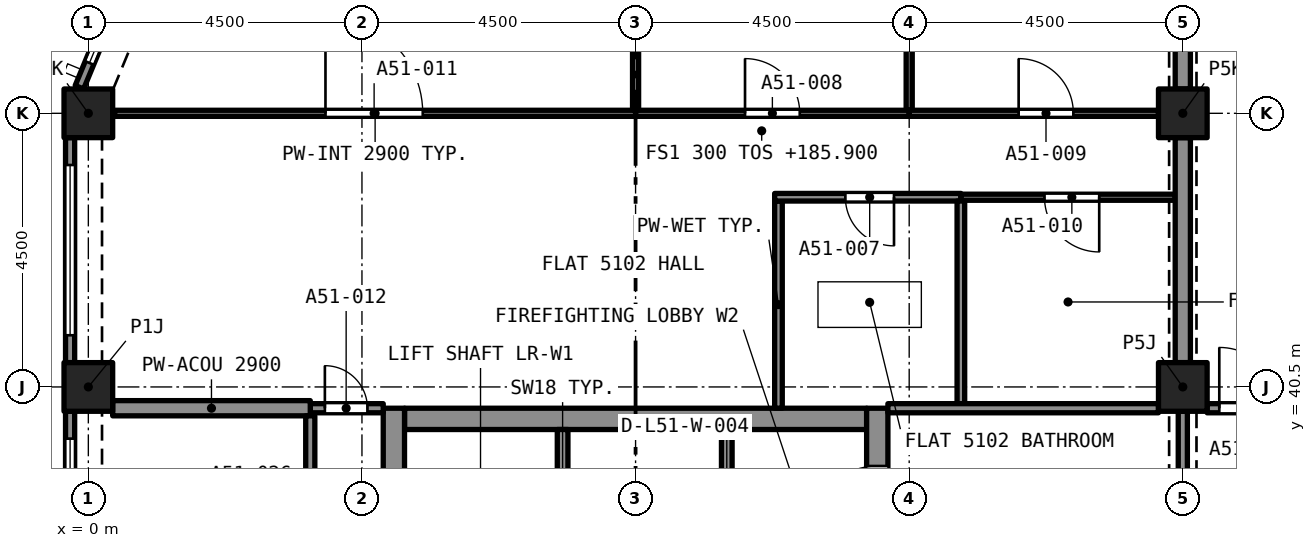
"""IFC4 building model, lengths in metres.
Left out: names, types, materials, properties, quantities, classifications, styles, units other than length and angle.
Written with IfcOpenShell. Run it as: python <this file> out.ifc"""

import sys

from ifc_helpers import new_model, si_unit, direction, frame, frame_2d, origin, origin_2d, place, context, subcontext, project, spatial, rectangle, extrude, element, fill, save


model = new_model("IFC4")
c1 = context("Model", 3, precision=1e-05, world=origin(), true_north=direction((0.0, 1.0)))
c2 = subcontext(c1, "Body", "Model", "MODEL_VIEW")
j1 = project(units=[si_unit("LENGTHUNIT", "METRE"), si_unit("PLANEANGLEUNIT", "RADIAN")], contexts=[c1])
p1 = place(None, origin())
s1 = spatial("IfcSite", under=j1, at=p1, CompositionType="ELEMENT")
p2 = place(p1, origin())
s2 = spatial("IfcBuilding", under=s1, at=p2, CompositionType="ELEMENT")
p3 = place(p2, frame((0.0, 0.0, 185.9)))
s3 = spatial("IfcBuildingStorey", under=s2, at=p3, CompositionType="ELEMENT", Elevation=185.9)
for number, where, z_axis, x_axis in (
    (1, (0.0, 40.5, 0.0), (0.0, 0.0, 1.0), (1.0, 0.0, 0.0)),
    (2, (18.0, 40.5, 0.0), (0.0, 0.0, 1.0), (1.0, 0.0, 0.0)),
    (3, (0.0, 45.0, 0.0), (0.0, 0.0, 1.0), (1.0, 0.0, 0.0)),
    (4, (18.0, 45.0, 0.0), (0.0, 0.0, 1.0), (1.0, 0.0, 0.0)),
):
    element("IfcColumn", number, at=place(p3, frame(where, z_axis=z_axis, x_axis=x_axis)), inside=s3, PredefinedType="COLUMN", context=c2, shape_type="SweptSolid", body=[
        extrude(rectangle(XDim=0.8, YDim=0.8, at=origin_2d()), origin(), (0.0, 0.0, 1.0), 3.2),
    ])
p4 = place(p3, frame((5.2, 39.975, 0.0), z_axis=(0.0, 0.0, 1.0), x_axis=(1.0, 0.0, 0.0)))
e5 = element("IfcWall", 5, at=p4, inside=s3, PredefinedType="SOLIDWALL", context=c2, shape_type="SweptSolid", body=[
    extrude(rectangle(XDim=7.6, YDim=0.35, at=frame_2d((3.8, 0.0))), origin(), (0.0, 0.0, 1.0), 3.2),
])
p5 = place(p3, frame((5.025, 27.35, 0.0), z_axis=(0.0, 0.0, 1.0), x_axis=(0.0, 1.0, 0.0)))
e6 = element("IfcWall", 6, at=p5, inside=s3, PredefinedType="SOLIDWALL", context=c2, shape_type="SweptSolid", body=[
    extrude(rectangle(XDim=12.8, YDim=0.35, at=frame_2d((6.4, 0.0))), origin(), (0.0, 0.0, 1.0), 3.2),
])
p6 = place(p5, frame((8.6, 0.0, 0.0)))
e7 = element("IfcOpeningElement", 7, at=p6, cuts=e6, PredefinedType="OPENING", context=c2, shape_type="SweptSolid", body=[
    extrude(rectangle(XDim=1.2, YDim=2.1, at=frame_2d((0.6, 1.05))), frame((0.0, 0.185, 0.0), z_axis=(0.0, -1.0, 0.0), x_axis=(1.0, 0.0, 0.0)), (0.0, 0.0, 1.0), 0.37),
])
p7 = place(p3, frame((12.975, 27.35, 0.0), z_axis=(0.0, 0.0, 1.0), x_axis=(0.0, 1.0, 0.0)))
e8 = element("IfcWall", 8, at=p7, inside=s3, PredefinedType="SOLIDWALL", context=c2, shape_type="SweptSolid", body=[
    extrude(rectangle(XDim=12.8, YDim=0.35, at=frame_2d((6.4, 0.0))), origin(), (0.0, 0.0, 1.0), 3.2),
])
p8 = place(p7, frame((10.75, 0.0, 0.0)))
e9 = element("IfcOpeningElement", 9, at=p8, cuts=e8, PredefinedType="OPENING", context=c2, shape_type="SweptSolid", body=[
    extrude(rectangle(XDim=1.1, YDim=2.1, at=frame_2d((0.55, 1.05))), frame((0.0, 0.185, 0.0), z_axis=(0.0, -1.0, 0.0), x_axis=(1.0, 0.0, 0.0)), (0.0, 0.0, 1.0), 0.37),
])
p9 = place(p7, frame((8.6, 0.0, 0.0)))
e10 = element("IfcOpeningElement", 10, at=p9, cuts=e8, PredefinedType="OPENING", context=c2, shape_type="SweptSolid", body=[
    extrude(rectangle(XDim=1.2, YDim=2.1, at=frame_2d((0.6, 1.05))), frame((0.0, 0.185, 0.0), z_axis=(0.0, -1.0, 0.0), x_axis=(1.0, 0.0, 0.0)), (0.0, 0.0, 1.0), 0.37),
])
p10 = place(p3, frame((-0.147, 45.429, 0.0), z_axis=(0.0, 0.0, 1.0), x_axis=(0.382669406082, 0.923885342263, 0.0)))
e11 = element("IfcWall", 11, at=p10, inside=s3, PredefinedType="SOLIDWALL", context=c2, shape_type="SweptSolid", body=[
    extrude(rectangle(XDim=2.602, YDim=0.15, at=frame_2d((1.301, 0.0))), origin(), (0.0, 0.0, 1.0), 3.2),
])
p11 = place(p10, frame((0.432, 0.0, 0.45)))
e12 = element("IfcOpeningElement", 12, at=p11, cuts=e11, PredefinedType="OPENING", context=c2, shape_type="SweptSolid", body=[
    extrude(rectangle(XDim=1.9, YDim=1.95, at=frame_2d((0.95, 0.975))), frame((0.0, 0.085, 0.0), z_axis=(0.0, -1.0, 0.0), x_axis=(1.0, 0.0, 0.0)), (0.0, 0.0, 1.0), 0.17),
])
p12 = place(p3, frame((-0.3, 40.9, 0.0), z_axis=(0.0, 0.0, 1.0), x_axis=(0.0, 1.0, 0.0)))
e13 = element("IfcWall", 13, at=p12, inside=s3, PredefinedType="SOLIDWALL", context=c2, shape_type="SweptSolid", body=[
    extrude(rectangle(XDim=3.7, YDim=0.15, at=frame_2d((1.85, 0.0))), origin(), (0.0, 0.0, 1.0), 3.2),
])
p13 = place(p12, frame((0.45, 0.0, 0.45)))
e14 = element("IfcOpeningElement", 14, at=p13, cuts=e13, PredefinedType="OPENING", context=c2, shape_type="SweptSolid", body=[
    extrude(rectangle(XDim=2.8, YDim=1.95, at=frame_2d((1.4, 0.975))), frame((0.0, 0.085, 0.0), z_axis=(0.0, -1.0, 0.0), x_axis=(1.0, 0.0, 0.0)), (0.0, 0.0, 1.0), 0.17),
])
p14 = place(p3, frame((-0.3, 36.4, 0.0), z_axis=(0.0, 0.0, 1.0), x_axis=(0.0, 1.0, 0.0)))
e15 = element("IfcWall", 15, at=p14, inside=s3, PredefinedType="SOLIDWALL", context=c2, shape_type="SweptSolid", body=[
    extrude(rectangle(XDim=3.7, YDim=0.15, at=frame_2d((1.85, 0.0))), origin(), (0.0, 0.0, 1.0), 3.2),
])
p15 = place(p14, frame((0.45, 0.0, 0.45)))
e16 = element("IfcOpeningElement", 16, at=p15, cuts=e15, PredefinedType="OPENING", context=c2, shape_type="SweptSolid", body=[
    extrude(rectangle(XDim=2.8, YDim=1.95, at=frame_2d((1.4, 0.975))), frame((0.0, 0.085, 0.0), z_axis=(0.0, -1.0, 0.0), x_axis=(1.0, 0.0, 0.0)), (0.0, 0.0, 1.0), 0.17),
])
p16 = place(p3, frame((11.35, 40.15, 0.0), z_axis=(0.0, 0.0, 1.0), x_axis=(0.0, 1.0, 0.0)))
e17 = element("IfcWall", 17, at=p16, inside=s3, PredefinedType="PARTITIONING", context=c2, shape_type="SweptSolid", body=[
    extrude(rectangle(XDim=3.408, YDim=0.125, at=frame_2d((1.704, 0.0))), origin(), (0.0, 0.0, 1.0), 2.9),
])
p17 = place(p3, frame((14.35, 43.62, 0.0), z_axis=(0.0, 0.0, 1.0), x_axis=(-1.0, 0.0, 0.0)))
e18 = element("IfcWall", 18, at=p17, inside=s3, PredefinedType="PARTITIONING", context=c2, shape_type="SweptSolid", body=[
    extrude(rectangle(XDim=3.063, YDim=0.125, at=frame_2d((1.531, 0.0))), origin(), (0.0, 0.0, 1.0), 2.9),
])
p18 = place(p17, frame((1.1, 0.0, 0.0)))
e19 = element("IfcOpeningElement", 19, at=p18, cuts=e18, PredefinedType="OPENING", context=c2, shape_type="SweptSolid", body=[
    extrude(rectangle(XDim=0.8, YDim=2.1, at=frame_2d((0.4, 1.05))), frame((0.0, 0.073, 0.0), z_axis=(0.0, -1.0, 0.0), x_axis=(1.0, 0.0, 0.0)), (0.0, 0.0, 1.0), 0.145),
])
p19 = place(p3, frame((14.35, 40.225, 0.0), z_axis=(0.0, 0.0, 1.0), x_axis=(0.0, 1.0, 0.0)))
e20 = element("IfcWall", 20, at=p19, inside=s3, PredefinedType="PARTITIONING", context=c2, shape_type="SweptSolid", body=[
    extrude(rectangle(XDim=3.333, YDim=0.125, at=frame_2d((1.666, 0.0))), origin(), (0.0, 0.0, 1.0), 2.9),
])
p20 = place(p3, frame((13.15, 40.15, 0.0), z_axis=(0.0, 0.0, 1.0), x_axis=(1.0, 0.0, 0.0)))
e21 = element("IfcWall", 21, at=p20, inside=s3, PredefinedType="PARTITIONING", context=c2, shape_type="SweptSolid", body=[
    extrude(rectangle(XDim=4.45, YDim=0.15, at=frame_2d((2.225, 0.0))), origin(), (0.0, 0.0, 1.0), 2.9),
])
p21 = place(p3, frame((13.5, 45.05, 0.0), z_axis=(0.0, 0.0, 1.0), x_axis=(0.0, 1.0, 0.0)))
e22 = element("IfcWall", 22, at=p21, inside=s3, PredefinedType="PARTITIONING", context=c2, shape_type="SweptSolid", body=[
    extrude(rectangle(XDim=4.05, YDim=0.1, at=frame_2d((2.025, 0.0))), origin(), (0.0, 0.0, 1.0), 2.9),
])
p22 = place(p3, frame((9.0, 45.0, 0.0), z_axis=(0.0, 0.0, 1.0), x_axis=(1.0, 0.0, 0.0)))
e23 = element("IfcWall", 23, at=p22, inside=s3, PredefinedType="PARTITIONING", context=c2, shape_type="SweptSolid", body=[
    extrude(rectangle(XDim=4.5, YDim=0.1, at=frame_2d((2.25, 0.0))), origin(), (0.0, 0.0, 1.0), 2.9),
])
p23 = place(p22, frame((1.8, 0.0, 0.0)))
e24 = element("IfcOpeningElement", 24, at=p23, cuts=e23, PredefinedType="OPENING", context=c2, shape_type="SweptSolid", body=[
    extrude(rectangle(XDim=0.9, YDim=2.1, at=frame_2d((0.45, 1.05))), frame((0.0, 0.06, 0.0), z_axis=(0.0, -1.0, 0.0), x_axis=(1.0, 0.0, 0.0)), (0.0, 0.0, 1.0), 0.12),
])
p24 = place(p3, frame((9.0, 45.05, 0.0), z_axis=(0.0, 0.0, 1.0), x_axis=(0.0, 1.0, 0.0)))
e25 = element("IfcWall", 25, at=p24, inside=s3, PredefinedType="PARTITIONING", context=c2, shape_type="SweptSolid", body=[
    extrude(rectangle(XDim=4.05, YDim=0.1, at=frame_2d((2.025, 0.0))), origin(), (0.0, 0.0, 1.0), 2.9),
])
p25 = place(p3, frame((13.5, 45.0, 0.0), z_axis=(0.0, 0.0, 1.0), x_axis=(1.0, 0.0, 0.0)))
e26 = element("IfcWall", 26, at=p25, inside=s3, PredefinedType="PARTITIONING", context=c2, shape_type="SweptSolid", body=[
    extrude(rectangle(XDim=4.1, YDim=0.1, at=frame_2d((2.05, 0.0))), origin(), (0.0, 0.0, 1.0), 2.9),
])
p26 = place(p25, frame((1.8, 0.0, 0.0)))
e27 = element("IfcOpeningElement", 27, at=p26, cuts=e26, PredefinedType="OPENING", context=c2, shape_type="SweptSolid", body=[
    extrude(rectangle(XDim=0.9, YDim=2.1, at=frame_2d((0.45, 1.05))), frame((0.0, 0.06, 0.0), z_axis=(0.0, -1.0, 0.0), x_axis=(1.0, 0.0, 0.0)), (0.0, 0.0, 1.0), 0.12),
])
p27 = place(p3, frame((18.0, 45.4, 0.0), z_axis=(0.0, 0.0, 1.0), x_axis=(0.0, 1.0, 0.0)))
e28 = element("IfcWall", 28, at=p27, inside=s3, PredefinedType="PARTITIONING", context=c2, shape_type="SweptSolid", body=[
    extrude(rectangle(XDim=3.7, YDim=0.25, at=frame_2d((1.85, 0.0))), origin(), (0.0, 0.0, 1.0), 2.38),
])
p28 = place(p3, frame((17.875, 43.62, 0.0), z_axis=(0.0, 0.0, 1.0), x_axis=(-1.0, 0.0, 0.0)))
e29 = element("IfcWall", 29, at=p28, inside=s3, PredefinedType="PARTITIONING", context=c2, shape_type="SweptSolid", body=[
    extrude(rectangle(XDim=3.525, YDim=0.1, at=frame_2d((1.762, 0.0))), origin(), (0.0, 0.0, 1.0), 2.9),
])
p29 = place(p28, frame((1.25, 0.0, 0.0)))
e30 = element("IfcOpeningElement", 30, at=p29, cuts=e29, PredefinedType="OPENING", context=c2, shape_type="SweptSolid", body=[
    extrude(rectangle(XDim=0.9, YDim=2.1, at=frame_2d((0.45, 1.05))), frame((0.0, 0.06, 0.0), z_axis=(0.0, -1.0, 0.0), x_axis=(1.0, 0.0, 0.0)), (0.0, 0.0, 1.0), 0.12),
])
p30 = place(p3, frame((0.433, 45.0, 0.0), z_axis=(0.0, 0.0, 1.0), x_axis=(1.0, 0.0, 0.0)))
e31 = element("IfcWall", 31, at=p30, inside=s3, PredefinedType="PARTITIONING", context=c2, shape_type="SweptSolid", body=[
    extrude(rectangle(XDim=8.567, YDim=0.1, at=frame_2d((4.284, 0.0))), origin(), (0.0, 0.0, 1.0), 2.9),
])
p31 = place(p30, frame((3.467, 0.0, 0.0)))
e32 = element("IfcOpeningElement", 32, at=p31, cuts=e31, PredefinedType="OPENING", context=c2, shape_type="SweptSolid", body=[
    extrude(rectangle(XDim=1.6, YDim=2.1, at=frame_2d((0.8, 1.05))), frame((0.0, 0.06, 0.0), z_axis=(0.0, -1.0, 0.0), x_axis=(1.0, 0.0, 0.0)), (0.0, 0.0, 1.0), 0.12),
])
p32 = place(p3, frame((3.65, 40.15, 0.0), z_axis=(0.0, 0.0, 1.0), x_axis=(1.0, 0.0, 0.0)))
e33 = element("IfcWall", 33, at=p32, inside=s3, PredefinedType="PARTITIONING", context=c2, shape_type="SweptSolid", body=[
    extrude(rectangle(XDim=1.2, YDim=0.15, at=frame_2d((0.6, 0.0))), origin(), (0.0, 0.0, 1.0), 2.9),
])
p33 = place(p32, frame((0.24, 0.0, 0.0)))
e34 = element("IfcOpeningElement", 34, at=p33, cuts=e33, PredefinedType="OPENING", context=c2, shape_type="SweptSolid", body=[
    extrude(rectangle(XDim=0.7, YDim=2.1, at=frame_2d((0.35, 1.05))), frame((0.0, 0.085, 0.0), z_axis=(0.0, -1.0, 0.0), x_axis=(1.0, 0.0, 0.0)), (0.0, 0.0, 1.0), 0.17),
])
p34 = place(p3, frame((0.4, 40.15, 0.0), z_axis=(0.0, 0.0, 1.0), x_axis=(1.0, 0.0, 0.0)))
e35 = element("IfcWall", 35, at=p34, inside=s3, PredefinedType="PARTITIONING", context=c2, shape_type="SweptSolid", body=[
    extrude(rectangle(XDim=3.25, YDim=0.25, at=frame_2d((1.625, 0.0))), origin(), (0.0, 0.0, 1.0), 2.9),
])
p35 = place(p3, frame((18.0, 40.9, 0.0), z_axis=(0.0, 0.0, 1.0), x_axis=(0.0, 1.0, 0.0)))
e36 = element("IfcWall", 36, at=p35, inside=s3, PredefinedType="PARTITIONING", context=c2, shape_type="SweptSolid", body=[
    extrude(rectangle(XDim=3.7, YDim=0.25, at=frame_2d((1.85, 0.0))), origin(), (0.0, 0.0, 1.0), 2.38),
])
p36 = place(p3, frame((18.4, 40.15, 0.0), z_axis=(0.0, 0.0, 1.0), x_axis=(1.0, 0.0, 0.0)))
e37 = element("IfcWall", 37, at=p36, inside=s3, PredefinedType="PARTITIONING", context=c2, shape_type="SweptSolid", body=[
    extrude(rectangle(XDim=2.2, YDim=0.15, at=frame_2d((1.1, 0.0))), origin(), (0.0, 0.0, 1.0), 2.75),
])
p37 = place(p36, frame((0.2, 0.0, 0.0)))
e38 = element("IfcOpeningElement", 38, at=p37, cuts=e37, PredefinedType="OPENING", context=c2, shape_type="SweptSolid", body=[
    extrude(rectangle(XDim=1.0, YDim=2.1, at=frame_2d((0.5, 1.05))), frame((0.0, 0.085, 0.0), z_axis=(0.0, -1.0, 0.0), x_axis=(1.0, 0.0, 0.0)), (0.0, 0.0, 1.0), 0.17),
])
p38 = place(p3, frame((18.0, 40.1, 0.0), z_axis=(0.0, 0.0, 1.0), x_axis=(0.0, -1.0, 0.0)))
e39 = element("IfcWall", 39, at=p38, inside=s3, PredefinedType="PARTITIONING", context=c2, shape_type="SweptSolid", body=[
    extrude(rectangle(XDim=3.7, YDim=0.15, at=frame_2d((1.85, 0.0))), origin(), (0.0, 0.0, 1.0), 2.38),
])
p39 = place(p38, frame((1.25, 0.0, 0.0)))
e40 = element("IfcOpeningElement", 40, at=p39, cuts=e39, PredefinedType="OPENING", context=c2, shape_type="SweptSolid", body=[
    extrude(rectangle(XDim=1.2, YDim=2.1, at=frame_2d((0.6, 1.05))), frame((0.0, 0.085, 0.0), z_axis=(0.0, -1.0, 0.0), x_axis=(1.0, 0.0, 0.0)), (0.0, 0.0, 1.0), 0.17),
])
p40 = place(p3, frame((3.65, 36.0, 0.0), z_axis=(0.0, 0.0, 1.0), x_axis=(0.0, 1.0, 0.0)))
e41 = element("IfcWall", 41, at=p40, inside=s3, PredefinedType="PARTITIONING", context=c2, shape_type="SweptSolid", body=[
    extrude(rectangle(XDim=4.025, YDim=0.15, at=frame_2d((2.012, 0.0))), origin(), (0.0, 0.0, 1.0), 2.9),
])
p41 = place(p40, frame((1.575, 0.0, 0.0)))
e42 = element("IfcOpeningElement", 42, at=p41, cuts=e41, PredefinedType="OPENING", context=c2, shape_type="SweptSolid", body=[
    extrude(rectangle(XDim=1.0, YDim=2.1, at=frame_2d((0.5, 1.05))), frame((0.0, 0.085, 0.0), z_axis=(0.0, -1.0, 0.0), x_axis=(1.0, 0.0, 0.0)), (0.0, 0.0, 1.0), 0.17),
])
p42 = place(p3, frame((7.8, 37.5, 0.0), z_axis=(0.0, 0.0, 1.0), x_axis=(0.0, 1.0, 0.0)))
e43 = element("IfcWall", 43, at=p42, inside=s3, PredefinedType="SOLIDWALL", context=c2, shape_type="SweptSolid", body=[
    extrude(rectangle(XDim=2.3, YDim=0.175, at=frame_2d((1.15, 0.0))), origin(), (0.0, 0.0, 1.0), 2.9),
])
p43 = place(p3, frame((10.5, 37.5, 0.0), z_axis=(0.0, 0.0, 1.0), x_axis=(0.0, 1.0, 0.0)))
e44 = element("IfcWall", 44, at=p43, inside=s3, PredefinedType="SOLIDWALL", context=c2, shape_type="SweptSolid", body=[
    extrude(rectangle(XDim=2.3, YDim=0.175, at=frame_2d((1.15, 0.0))), origin(), (0.0, 0.0, 1.0), 2.9),
])
p44 = place(p43, frame((0.65, 0.0, 0.0)))
e45 = element("IfcOpeningElement", 45, at=p44, cuts=e44, PredefinedType="OPENING", context=c2, shape_type="SweptSolid", body=[
    extrude(rectangle(XDim=1.0, YDim=2.1, at=frame_2d((0.5, 1.05))), frame((0.0, 0.097, 0.0), z_axis=(0.0, -1.0, 0.0), x_axis=(1.0, 0.0, 0.0)), (0.0, 0.0, 1.0), 0.195),
])
p45 = place(p11, origin())
e46 = element("IfcWindow", 46, at=p45, inside=s3, PartitioningType="SINGLE_PANEL", PredefinedType="WINDOW", context=c2, shape_type="SweptSolid", body=[
    extrude(rectangle(XDim=1.9, YDim=1.95, at=frame_2d((0.95, 0.975))), frame((0.0, 0.03, 0.0), z_axis=(0.0, -1.0, 0.0), x_axis=(1.0, 0.0, 0.0)), (0.0, 0.0, 1.0), 0.06),
])
fill(e12, e46)
p46 = place(p13, origin())
e47 = element("IfcWindow", 47, at=p46, inside=s3, PartitioningType="SINGLE_PANEL", PredefinedType="WINDOW", context=c2, shape_type="SweptSolid", body=[
    extrude(rectangle(XDim=2.8, YDim=1.95, at=frame_2d((1.4, 0.975))), frame((0.0, 0.03, 0.0), z_axis=(0.0, -1.0, 0.0), x_axis=(1.0, 0.0, 0.0)), (0.0, 0.0, 1.0), 0.06),
])
fill(e14, e47)
p47 = place(p15, origin())
e48 = element("IfcWindow", 48, at=p47, inside=s3, PartitioningType="SINGLE_PANEL", PredefinedType="WINDOW", context=c2, shape_type="SweptSolid", body=[
    extrude(rectangle(XDim=2.8, YDim=1.95, at=frame_2d((1.4, 0.975))), frame((0.0, 0.03, 0.0), z_axis=(0.0, -1.0, 0.0), x_axis=(1.0, 0.0, 0.0)), (0.0, 0.0, 1.0), 0.06),
])
fill(e16, e48)
p48 = place(p18, origin())
e49 = element("IfcDoor", 49, at=p48, inside=s3, OperationType="SINGLE_SWING_LEFT", PredefinedType="DOOR", context=c2, shape_type="SweptSolid", body=[
    extrude(rectangle(XDim=0.8, YDim=2.1, at=frame_2d((0.4, 1.05))), frame((0.0, 0.025, 0.0), z_axis=(0.0, -1.0, 0.0), x_axis=(1.0, 0.0, 0.0)), (0.0, 0.0, 1.0), 0.05),
])
fill(e19, e49)
p49 = place(p23, origin())
e50 = element("IfcDoor", 50, at=p49, inside=s3, OperationType="SINGLE_SWING_LEFT", PredefinedType="DOOR", context=c2, shape_type="SweptSolid", body=[
    extrude(rectangle(XDim=0.9, YDim=2.1, at=frame_2d((0.45, 1.05))), frame((0.0, 0.025, 0.0), z_axis=(0.0, -1.0, 0.0), x_axis=(1.0, 0.0, 0.0)), (0.0, 0.0, 1.0), 0.05),
])
fill(e24, e50)
p50 = place(p26, origin())
e51 = element("IfcDoor", 51, at=p50, inside=s3, OperationType="SINGLE_SWING_RIGHT", PredefinedType="DOOR", context=c2, shape_type="SweptSolid", body=[
    extrude(rectangle(XDim=0.9, YDim=2.1, at=frame_2d((0.45, 1.05))), frame((0.0, 0.025, 0.0), z_axis=(0.0, -1.0, 0.0), x_axis=(1.0, 0.0, 0.0)), (0.0, 0.0, 1.0), 0.05),
])
fill(e27, e51)
p51 = place(p29, origin())
e52 = element("IfcDoor", 52, at=p51, inside=s3, OperationType="SINGLE_SWING_LEFT", PredefinedType="DOOR", context=c2, shape_type="SweptSolid", body=[
    extrude(rectangle(XDim=0.9, YDim=2.1, at=frame_2d((0.45, 1.05))), frame((0.0, 0.025, 0.0), z_axis=(0.0, -1.0, 0.0), x_axis=(1.0, 0.0, 0.0)), (0.0, 0.0, 1.0), 0.05),
])
fill(e30, e52)
p52 = place(p31, origin())
e53 = element("IfcDoor", 53, at=p52, inside=s3, OperationType="SINGLE_SWING_LEFT", PredefinedType="DOOR", context=c2, shape_type="SweptSolid", body=[
    extrude(rectangle(XDim=1.6, YDim=2.1, at=frame_2d((0.8, 1.05))), frame((0.0, 0.025, 0.0), z_axis=(0.0, -1.0, 0.0), x_axis=(1.0, 0.0, 0.0)), (0.0, 0.0, 1.0), 0.05),
])
fill(e32, e53)
p53 = place(p33, origin())
e54 = element("IfcDoor", 54, at=p53, inside=s3, OperationType="SINGLE_SWING_LEFT", PredefinedType="DOOR", context=c2, shape_type="SweptSolid", body=[
    extrude(rectangle(XDim=0.7, YDim=2.1, at=frame_2d((0.35, 1.05))), frame((0.0, 0.025, 0.0), z_axis=(0.0, -1.0, 0.0), x_axis=(1.0, 0.0, 0.0)), (0.0, 0.0, 1.0), 0.05),
])
fill(e34, e54)
p54 = place(p37, origin())
e55 = element("IfcDoor", 55, at=p54, inside=s3, OperationType="SINGLE_SWING_LEFT", PredefinedType="DOOR", context=c2, shape_type="SweptSolid", body=[
    extrude(rectangle(XDim=1.0, YDim=2.1, at=frame_2d((0.5, 1.05))), frame((0.0, 0.025, 0.0), z_axis=(0.0, -1.0, 0.0), x_axis=(1.0, 0.0, 0.0)), (0.0, 0.0, 1.0), 0.05),
])
fill(e38, e55)
p55 = place(p8, origin())
e56 = element("IfcDoor", 56, at=p55, inside=s3, OperationType="SINGLE_SWING_LEFT", PredefinedType="DOOR", context=c2, shape_type="SweptSolid", body=[
    extrude(rectangle(XDim=1.1, YDim=2.1, at=frame_2d((0.55, 1.05))), frame((0.0, 0.025, 0.0), z_axis=(0.0, -1.0, 0.0), x_axis=(1.0, 0.0, 0.0)), (0.0, 0.0, 1.0), 0.05),
])
fill(e9, e56)
save(model, sys.argv[1])
